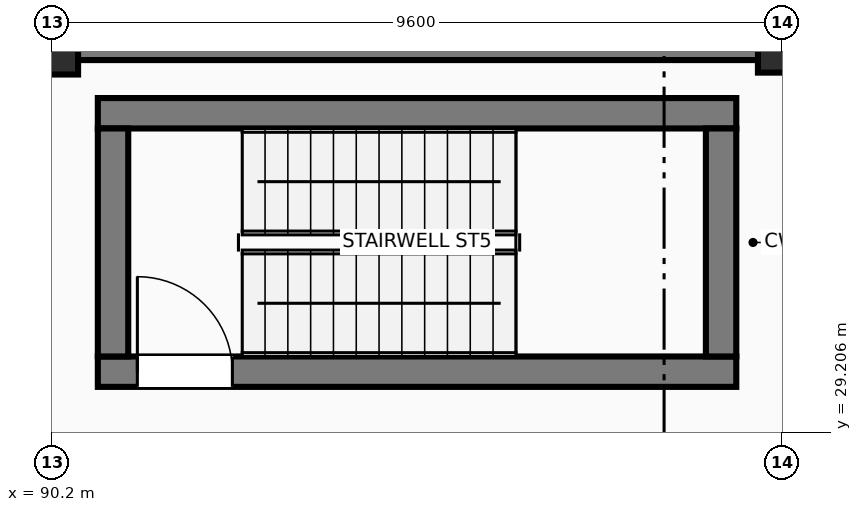
"""IFC4 building model, lengths in metres.
Left out: names, types, materials, properties, quantities, classifications, styles, units other than length and angle.
Written with IfcOpenShell. Run it as: python <this file> out.ifc"""

import sys

from ifc_helpers import new_model, si_unit, direction, frame, frame_2d, origin, origin_2d, place, context, subcontext, project, spatial, rectangle, extrude, element, fill, save


model = new_model("IFC4")
c1 = context("Model", 3, precision=1e-05, world=origin(), true_north=direction((0.0, 1.0)))
c2 = subcontext(c1, "Body", "Model", "MODEL_VIEW")
j1 = project(units=[si_unit("LENGTHUNIT", "METRE"), si_unit("PLANEANGLEUNIT", "RADIAN")], contexts=[c1])
p1 = place(None, origin())
s1 = spatial("IfcSite", under=j1, at=p1, CompositionType="ELEMENT")
p2 = place(p1, origin())
s2 = spatial("IfcBuilding", under=s1, at=p2, CompositionType="ELEMENT")
p3 = place(p2, frame((0.0, 0.0, -4.5)))
s3 = spatial("IfcBuildingStorey", under=s2, at=p3, CompositionType="ELEMENT", Elevation=-4.5)
p4 = place(p3, frame((90.2, 34.25, -0.55), z_axis=(0.0, 0.0, 1.0), x_axis=(1.0, 0.0, 0.0)))
e1 = element("IfcColumn", 1, at=p4, inside=s3, PredefinedType="COLUMN", context=c2, shape_type="SweptSolid", body=[
    extrude(rectangle(XDim=0.68, YDim=0.68, at=origin_2d()), origin(), (0.0, 0.0, 1.0), 5.05),
])
p5 = place(p3, frame((99.8, 34.25, -0.55), z_axis=(0.0, 0.0, 1.0), x_axis=(1.0, 0.0, 0.0)))
e2 = element("IfcColumn", 2, at=p5, inside=s3, PredefinedType="COLUMN", context=c2, shape_type="SweptSolid", body=[
    extrude(rectangle(XDim=0.63, YDim=0.63, at=origin_2d()), origin(), (0.0, 0.0, 1.0), 5.05),
])
p6 = place(p3, frame((101.4, 34.35, 0.0), z_axis=(0.0, 0.0, 1.0), x_axis=(-1.0, 0.0, 0.0)))
e3 = element("IfcWall", 3, at=p6, inside=s3, PredefinedType="SHEAR", context=c2, shape_type="SweptSolid", body=[
    extrude(rectangle(XDim=44.6, YDim=0.5, at=frame_2d((22.3, 0.0))), origin(), (0.0, 0.0, 1.0), 4.22),
])
p7 = place(p3, frame((90.8, 30.0, -0.55), z_axis=(0.0, 0.0, 1.0), x_axis=(1.0, 0.0, 0.0)))
e4 = element("IfcWall", 4, at=p7, inside=s3, PredefinedType="SHEAR", context=c2, shape_type="SweptSolid", body=[
    extrude(rectangle(XDim=8.4, YDim=0.4, at=frame_2d((4.2, 0.0))), origin(), (0.0, 0.0, 1.0), 4.77),
])
p8 = place(p7, frame((0.52, 0.0, 0.55)))
e5 = element("IfcOpeningElement", 5, at=p8, cuts=e4, PredefinedType="OPENING", context=c2, shape_type="SweptSolid", body=[
    extrude(rectangle(XDim=1.25, YDim=2.2, at=frame_2d((0.625, 1.1))), frame((0.0, 0.21, 0.0), z_axis=(0.0, -1.0, 0.0), x_axis=(1.0, 0.0, 0.0)), (0.0, 0.0, 1.0), 0.42),
])
p9 = place(p3, frame((99.2, 33.4, -0.55), z_axis=(0.0, 0.0, 1.0), x_axis=(-1.0, 0.0, 0.0)))
e6 = element("IfcWall", 6, at=p9, inside=s3, PredefinedType="SHEAR", context=c2, shape_type="SweptSolid", body=[
    extrude(rectangle(XDim=8.4, YDim=0.4, at=frame_2d((4.2, 0.0))), origin(), (0.0, 0.0, 1.0), 4.77),
])
for number, where, z_axis, x_axis in (
    (7, (91.0, 30.2, -0.55), (0.0, 0.0, 1.0), (0.0, 1.0, 0.0)),
    (8, (99.0, 33.2, -0.55), (0.0, 0.0, 1.0), (0.0, -1.0, 0.0)),
):
    element("IfcWall", number, at=place(p3, frame(where, z_axis=z_axis, x_axis=x_axis)), inside=s3, PredefinedType="SHEAR", context=c2, shape_type="SweptSolid", body=[
        extrude(rectangle(XDim=3.0, YDim=0.4, at=frame_2d((1.5, 0.0))), origin(), (0.0, 0.0, 1.0), 4.77),
    ])
p10 = place(p8, origin())
e9 = element("IfcDoor", 9, at=p10, inside=s3, OperationType="SINGLE_SWING_LEFT", PredefinedType="DOOR", context=c2, shape_type="SweptSolid", body=[
    extrude(rectangle(XDim=1.25, YDim=2.2, at=frame_2d((0.625, 1.1))), frame((0.0, 0.025, 0.0), z_axis=(0.0, -1.0, 0.0), x_axis=(1.0, 0.0, 0.0)), (0.0, 0.0, 1.0), 0.05),
])
fill(e5, e9)
save(model, sys.argv[1])
